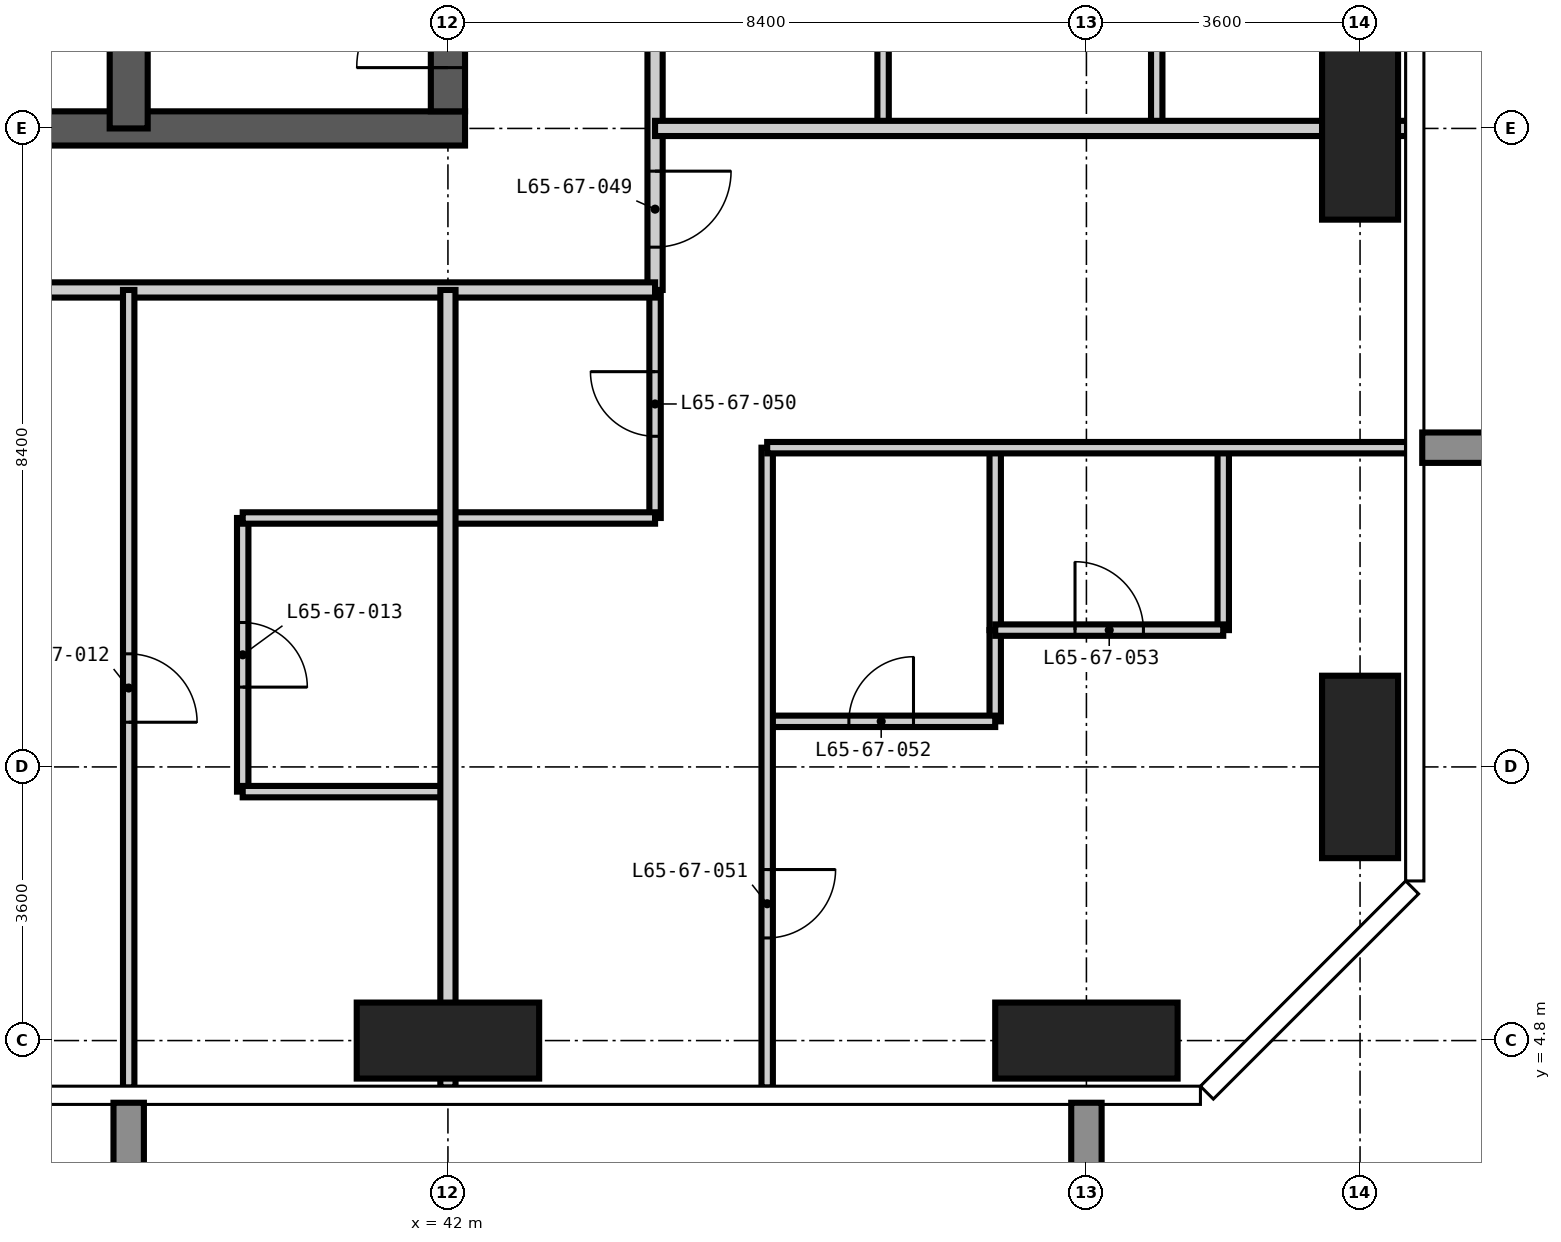
"""IFC4 building model, lengths in metres.
Left out: names, types, materials, properties, quantities, classifications, styles, units other than length and angle.
Written with IfcOpenShell. Run it as: python <this file> out.ifc"""

import sys

from ifc_helpers import new_model, si_unit, direction, frame, frame_2d, origin, origin_2d, place, context, subcontext, project, spatial, rectangle, extrude, element, fill, save


model = new_model("IFC4")
c1 = context("Model", 3, precision=1e-05, world=origin(), true_north=direction((0.0, 1.0)))
c2 = subcontext(c1, "Body", "Model", "MODEL_VIEW")
j1 = project(units=[si_unit("LENGTHUNIT", "METRE"), si_unit("PLANEANGLEUNIT", "RADIAN")], contexts=[c1])
p1 = place(None, origin())
s1 = spatial("IfcSite", under=j1, at=p1, CompositionType="ELEMENT")
p2 = place(p1, origin())
s2 = spatial("IfcBuilding", under=s1, at=p2, CompositionType="ELEMENT")
p3 = place(p2, frame((0.0, 0.0, 252.9)))
s3 = spatial("IfcBuildingStorey", under=s2, at=p3, CompositionType="ELEMENT", Elevation=252.9)
for number, where, z_axis, x_axis in (
    (1, (42.0, 4.8, -0.35), (0.0, 0.0, 1.0), (1.0, 0.0, 0.0)),
    (2, (50.4, 4.8, -0.35), (0.0, 0.0, 1.0), (1.0, 0.0, 0.0)),
):
    element("IfcColumn", number, at=place(p3, frame(where, z_axis=z_axis, x_axis=x_axis)), inside=s3, PredefinedType="COLUMN", context=c2, shape_type="SweptSolid", body=[
        extrude(rectangle(XDim=2.4, YDim=1.0, at=origin_2d()), origin(), (0.0, 0.0, 1.0), 3.9),
    ])
for number, where, z_axis, x_axis in (
    (3, (54.0, 8.4, -0.35), (0.0, 0.0, 1.0), (1.0, 0.0, 0.0)),
    (4, (54.0, 16.8, -0.35), (0.0, 0.0, 1.0), (1.0, 0.0, 0.0)),
):
    element("IfcColumn", number, at=place(p3, frame(where, z_axis=z_axis, x_axis=x_axis)), inside=s3, PredefinedType="COLUMN", context=c2, shape_type="SweptSolid", body=[
        extrude(rectangle(XDim=1.0, YDim=2.4, at=origin_2d()), origin(), (0.0, 0.0, 1.0), 3.9),
    ])
p4 = place(p3, frame((24.975, 16.8, -0.35), z_axis=(0.0, 0.0, 1.0), x_axis=(1.0, 0.0, 0.0)))
e5 = element("IfcWall", 5, at=p4, inside=s3, PredefinedType="SHEAR", context=c2, shape_type="SweptSolid", body=[
    extrude(rectangle(XDim=17.25, YDim=0.45, at=frame_2d((8.625, 0.0))), origin(), (0.0, 0.0, 1.0), 3.9),
])
p5 = place(p4, frame((3.925, 0.0, 0.35)))
e6 = element("IfcOpeningElement", 6, at=p5, cuts=e5, PredefinedType="OPENING", context=c2, shape_type="SweptSolid", body=[
    extrude(rectangle(XDim=1.0, YDim=2.1, at=frame_2d((0.5, 1.05))), frame((0.0, 0.235, 0.0), z_axis=(0.0, -1.0, 0.0), x_axis=(1.0, 0.0, 0.0)), (0.0, 0.0, 1.0), 0.47),
])
p6 = place(p4, frame((10.225, 0.0, 0.35)))
e7 = element("IfcOpeningElement", 7, at=p6, cuts=e5, PredefinedType="OPENING", context=c2, shape_type="SweptSolid", body=[
    extrude(rectangle(XDim=1.0, YDim=2.1, at=frame_2d((0.5, 1.05))), frame((0.0, 0.235, 0.0), z_axis=(0.0, -1.0, 0.0), x_axis=(1.0, 0.0, 0.0)), (0.0, 0.0, 1.0), 0.47),
])
p7 = place(p3, frame((42.0, 17.025, -0.35), z_axis=(0.0, 0.0, 1.0), x_axis=(0.0, 1.0, 0.0)))
e8 = element("IfcWall", 8, at=p7, inside=s3, PredefinedType="SHEAR", context=c2, shape_type="SweptSolid", body=[
    extrude(rectangle(XDim=24.75, YDim=0.45, at=frame_2d((12.375, 0.0))), origin(), (0.0, 0.0, 1.0), 3.9),
])
p8 = place(p7, frame((0.575, 0.0, 0.35)))
e9 = element("IfcOpeningElement", 9, at=p8, cuts=e8, PredefinedType="OPENING", context=c2, shape_type="SweptSolid", body=[
    extrude(rectangle(XDim=1.2, YDim=2.2, at=frame_2d((0.6, 1.1))), frame((0.0, 0.235, 0.0), z_axis=(0.0, -1.0, 0.0), x_axis=(1.0, 0.0, 0.0)), (0.0, 0.0, 1.0), 0.47),
])
p9 = place(p7, frame((11.475, 0.0, 0.35)))
e10 = element("IfcOpeningElement", 10, at=p9, cuts=e8, PredefinedType="OPENING", context=c2, shape_type="SweptSolid", body=[
    extrude(rectangle(XDim=1.8, YDim=2.2, at=frame_2d((0.9, 1.1))), frame((0.0, 0.235, 0.0), z_axis=(0.0, -1.0, 0.0), x_axis=(1.0, 0.0, 0.0)), (0.0, 0.0, 1.0), 0.47),
])
p10 = place(p7, frame((20.275, 0.0, 0.35)))
e11 = element("IfcOpeningElement", 11, at=p10, cuts=e8, PredefinedType="OPENING", context=c2, shape_type="SweptSolid", body=[
    extrude(rectangle(XDim=1.0, YDim=2.1, at=frame_2d((0.5, 1.05))), frame((0.0, 0.235, 0.0), z_axis=(0.0, -1.0, 0.0), x_axis=(1.0, 0.0, 0.0)), (0.0, 0.0, 1.0), 0.47),
])
p11 = place(p3, frame((37.8, 16.8, -0.35), z_axis=(0.0, 0.0, 1.0), x_axis=(0.0, 1.0, 0.0)))
e12 = element("IfcWall", 12, at=p11, inside=s3, PredefinedType="SHEAR", context=c2, shape_type="SweptSolid", body=[
    extrude(rectangle(XDim=11.2, YDim=0.5, at=frame_2d((5.6, 0.0))), origin(), (0.0, 0.0, 1.0), 3.9),
])
p12 = place(p3, frame((39.3, 8.075, 0.0), z_axis=(0.0, 0.0, 1.0), x_axis=(0.0, 1.0, 0.0)))
e13 = element("IfcWall", 13, at=p12, inside=s3, PredefinedType="PARTITIONING", context=c2, shape_type="SweptSolid", body=[
    extrude(rectangle(XDim=3.6, YDim=0.15, at=frame_2d((1.8, 0.0))), origin(), (0.0, 0.0, 1.0), 3.55),
])
p13 = place(p12, frame((1.375, 0.0, 0.0)))
e14 = element("IfcOpeningElement", 14, at=p13, cuts=e13, PredefinedType="OPENING", context=c2, shape_type="SweptSolid", body=[
    extrude(rectangle(XDim=0.85, YDim=2.1, at=frame_2d((0.425, 1.05))), frame((0.0, 0.085, 0.0), z_axis=(0.0, -1.0, 0.0), x_axis=(1.0, 0.0, 0.0)), (0.0, 0.0, 1.0), 0.17),
])
p14 = place(p3, frame((44.725, 11.675, 0.0), z_axis=(0.0, 0.0, 1.0), x_axis=(0.0, 1.0, 0.0)))
e15 = element("IfcWall", 15, at=p14, inside=s3, PredefinedType="PARTITIONING", context=c2, shape_type="SweptSolid", body=[
    extrude(rectangle(XDim=3.0, YDim=0.15, at=frame_2d((1.5, 0.0))), origin(), (0.0, 0.0, 1.0), 3.55),
])
p15 = place(p14, frame((1.075, 0.0, 0.0)))
e16 = element("IfcOpeningElement", 16, at=p15, cuts=e15, PredefinedType="OPENING", context=c2, shape_type="SweptSolid", body=[
    extrude(rectangle(XDim=0.85, YDim=2.1, at=frame_2d((0.425, 1.05))), frame((0.0, 0.085, 0.0), z_axis=(0.0, -1.0, 0.0), x_axis=(1.0, 0.0, 0.0)), (0.0, 0.0, 1.0), 0.17),
])
p16 = place(p3, frame((47.725, 16.8, 0.0), z_axis=(0.0, 0.0, 1.0), x_axis=(0.0, 1.0, 0.0)))
e17 = element("IfcWall", 17, at=p16, inside=s3, PredefinedType="PARTITIONING", context=c2, shape_type="SweptSolid", body=[
    extrude(rectangle(XDim=2.7, YDim=0.15, at=frame_2d((1.35, 0.0))), origin(), (0.0, 0.0, 1.0), 3.55),
])
p17 = place(p3, frame((49.2, 9.0, 0.0), z_axis=(0.0, 0.0, 1.0), x_axis=(0.0, 1.0, 0.0)))
e18 = element("IfcWall", 18, at=p17, inside=s3, PredefinedType="PARTITIONING", context=c2, shape_type="SweptSolid", body=[
    extrude(rectangle(XDim=1.2, YDim=0.15, at=frame_2d((0.6, 0.0))), origin(), (0.0, 0.0, 1.0), 3.55),
])
for number, where, z_axis, x_axis in (
    (19, (51.325, 16.8, 0.0), (0.0, 0.0, 1.0), (0.0, 1.0, 0.0)),
    (20, (39.3, 8.075, 0.0), (0.0, 0.0, 1.0), (1.0, 0.0, 0.0)),
):
    element("IfcWall", number, at=place(p3, frame(where, z_axis=z_axis, x_axis=x_axis)), inside=s3, PredefinedType="PARTITIONING", context=c2, shape_type="SweptSolid", body=[
        extrude(rectangle(XDim=2.7, YDim=0.15, at=frame_2d((1.35, 0.0))), origin(), (0.0, 0.0, 1.0), 3.55),
    ])
p18 = place(p3, frame((46.2, 9.0, 0.0), z_axis=(0.0, 0.0, 1.0), x_axis=(1.0, 0.0, 0.0)))
e21 = element("IfcWall", 21, at=p18, inside=s3, PredefinedType="PARTITIONING", context=c2, shape_type="SweptSolid", body=[
    extrude(rectangle(XDim=3.0, YDim=0.15, at=frame_2d((1.5, 0.0))), origin(), (0.0, 0.0, 1.0), 3.55),
])
p19 = place(p18, frame((1.075, 0.0, 0.0)))
e22 = element("IfcOpeningElement", 22, at=p19, cuts=e21, PredefinedType="OPENING", context=c2, shape_type="SweptSolid", body=[
    extrude(rectangle(XDim=0.85, YDim=2.1, at=frame_2d((0.425, 1.05))), frame((0.0, 0.085, 0.0), z_axis=(0.0, -1.0, 0.0), x_axis=(1.0, 0.0, 0.0)), (0.0, 0.0, 1.0), 0.17),
])
p20 = place(p3, frame((39.3, 11.675, 0.0), z_axis=(0.0, 0.0, 1.0), x_axis=(1.0, 0.0, 0.0)))
e23 = element("IfcWall", 23, at=p20, inside=s3, PredefinedType="PARTITIONING", context=c2, shape_type="SweptSolid", body=[
    extrude(rectangle(XDim=5.425, YDim=0.15, at=frame_2d((2.712, 0.0))), origin(), (0.0, 0.0, 1.0), 3.55),
])
p21 = place(p3, frame((44.725, 29.4, 0.0), z_axis=(0.0, 0.0, 1.0), x_axis=(0.0, -1.0, 0.0)))
e24 = element("IfcWall", 24, at=p21, inside=s3, PredefinedType="PARTITIONING", context=c2, shape_type="SweptSolid", body=[
    extrude(rectangle(XDim=14.725, YDim=0.2, at=frame_2d((7.362, 0.0))), origin(), (0.0, 0.0, 1.0), 3.55),
])
p22 = place(p21, frame((5.8, 0.0, 0.0)))
e25 = element("IfcOpeningElement", 25, at=p22, cuts=e24, PredefinedType="OPENING", context=c2, shape_type="SweptSolid", body=[
    extrude(rectangle(XDim=1.0, YDim=2.2, at=frame_2d((0.5, 1.1))), frame((0.0, 0.11, 0.0), z_axis=(0.0, -1.0, 0.0), x_axis=(1.0, 0.0, 0.0)), (0.0, 0.0, 1.0), 0.22),
])
p23 = place(p21, frame((13.162, 0.0, 0.0)))
e26 = element("IfcOpeningElement", 26, at=p23, cuts=e24, PredefinedType="OPENING", context=c2, shape_type="SweptSolid", body=[
    extrude(rectangle(XDim=1.0, YDim=2.2, at=frame_2d((0.5, 1.1))), frame((0.0, 0.11, 0.0), z_axis=(0.0, -1.0, 0.0), x_axis=(1.0, 0.0, 0.0)), (0.0, 0.0, 1.0), 0.22),
])
p24 = place(p3, frame((44.725, 14.675, 0.0), z_axis=(0.0, 0.0, 1.0), x_axis=(-1.0, 0.0, 0.0)))
e27 = element("IfcWall", 27, at=p24, inside=s3, PredefinedType="PARTITIONING", context=c2, shape_type="SweptSolid", body=[
    extrude(rectangle(XDim=21.65, YDim=0.2, at=frame_2d((10.825, 0.0))), origin(), (0.0, 0.0, 1.0), 3.55),
])
p25 = place(p24, frame((11.825, 0.0, 0.0)))
e28 = element("IfcOpeningElement", 28, at=p25, cuts=e27, PredefinedType="OPENING", context=c2, shape_type="SweptSolid", body=[
    extrude(rectangle(XDim=1.0, YDim=2.2, at=frame_2d((0.5, 1.1))), frame((0.0, 0.11, 0.0), z_axis=(0.0, -1.0, 0.0), x_axis=(1.0, 0.0, 0.0)), (0.0, 0.0, 1.0), 0.22),
])
p26 = place(p3, frame((42.0, 4.182, 0.0), z_axis=(0.0, 0.0, 1.0), x_axis=(0.0, 1.0, 0.0)))
e29 = element("IfcWall", 29, at=p26, inside=s3, PredefinedType="PARTITIONING", context=c2, shape_type="SweptSolid", body=[
    extrude(rectangle(XDim=10.493, YDim=0.2, at=frame_2d((5.247, 0.0))), origin(), (0.0, 0.0, 1.0), 3.55),
])
p27 = place(p3, frame((44.725, 16.8, 0.0), z_axis=(0.0, 0.0, 1.0), x_axis=(1.0, 0.0, 0.0)))
e30 = element("IfcWall", 30, at=p27, inside=s3, PredefinedType="PARTITIONING", context=c2, shape_type="SweptSolid", body=[
    extrude(rectangle(XDim=9.893, YDim=0.2, at=frame_2d((4.946, 0.0))), origin(), (0.0, 0.0, 1.0), 3.55),
])
p28 = place(p3, frame((37.8, 4.182, 0.0), z_axis=(0.0, 0.0, 1.0), x_axis=(0.0, 1.0, 0.0)))
e31 = element("IfcWall", 31, at=p28, inside=s3, PredefinedType="PARTITIONING", context=c2, shape_type="SweptSolid", body=[
    extrude(rectangle(XDim=10.493, YDim=0.15, at=frame_2d((5.247, 0.0))), origin(), (0.0, 0.0, 1.0), 3.55),
])
p29 = place(p28, frame((4.806, 0.0, 0.0)))
e32 = element("IfcOpeningElement", 32, at=p29, cuts=e31, PredefinedType="OPENING", context=c2, shape_type="SweptSolid", body=[
    extrude(rectangle(XDim=0.9, YDim=2.1, at=frame_2d((0.45, 1.05))), frame((0.0, 0.085, 0.0), z_axis=(0.0, -1.0, 0.0), x_axis=(1.0, 0.0, 0.0)), (0.0, 0.0, 1.0), 0.17),
])
p30 = place(p3, frame((46.2, 4.182, 0.0), z_axis=(0.0, 0.0, 1.0), x_axis=(0.0, 1.0, 0.0)))
e33 = element("IfcWall", 33, at=p30, inside=s3, PredefinedType="PARTITIONING", context=c2, shape_type="SweptSolid", body=[
    extrude(rectangle(XDim=8.418, YDim=0.15, at=frame_2d((4.209, 0.0))), origin(), (0.0, 0.0, 1.0), 3.55),
])
p31 = place(p30, frame((1.968, 0.0, 0.0)))
e34 = element("IfcOpeningElement", 34, at=p31, cuts=e33, PredefinedType="OPENING", context=c2, shape_type="SweptSolid", body=[
    extrude(rectangle(XDim=0.9, YDim=2.1, at=frame_2d((0.45, 1.05))), frame((0.0, 0.085, 0.0), z_axis=(0.0, -1.0, 0.0), x_axis=(1.0, 0.0, 0.0)), (0.0, 0.0, 1.0), 0.17),
])
for number, where, z_axis, x_axis in (
    (35, (49.2, 10.2, 0.0), (0.0, 0.0, 1.0), (0.0, 1.0, 0.0)),
    (36, (52.2, 10.2, 0.0), (0.0, 0.0, 1.0), (0.0, 1.0, 0.0)),
):
    element("IfcWall", number, at=place(p3, frame(where, z_axis=z_axis, x_axis=x_axis)), inside=s3, PredefinedType="PARTITIONING", context=c2, shape_type="SweptSolid", body=[
        extrude(rectangle(XDim=2.4, YDim=0.15, at=frame_2d((1.2, 0.0))), origin(), (0.0, 0.0, 1.0), 3.55),
    ])
p32 = place(p3, frame((49.2, 10.2, 0.0), z_axis=(0.0, 0.0, 1.0), x_axis=(1.0, 0.0, 0.0)))
e37 = element("IfcWall", 37, at=p32, inside=s3, PredefinedType="PARTITIONING", context=c2, shape_type="SweptSolid", body=[
    extrude(rectangle(XDim=3.0, YDim=0.15, at=frame_2d((1.5, 0.0))), origin(), (0.0, 0.0, 1.0), 3.55),
])
p33 = place(p32, frame((1.05, 0.0, 0.0)))
e38 = element("IfcOpeningElement", 38, at=p33, cuts=e37, PredefinedType="OPENING", context=c2, shape_type="SweptSolid", body=[
    extrude(rectangle(XDim=0.9, YDim=2.1, at=frame_2d((0.45, 1.05))), frame((0.0, 0.085, 0.0), z_axis=(0.0, -1.0, 0.0), x_axis=(1.0, 0.0, 0.0)), (0.0, 0.0, 1.0), 0.17),
])
p34 = place(p3, frame((46.2, 12.6, 0.0), z_axis=(0.0, 0.0, 1.0), x_axis=(1.0, 0.0, 0.0)))
e39 = element("IfcWall", 39, at=p34, inside=s3, PredefinedType="PARTITIONING", context=c2, shape_type="SweptSolid", body=[
    extrude(rectangle(XDim=8.418, YDim=0.15, at=frame_2d((4.209, 0.0))), origin(), (0.0, 0.0, 1.0), 3.55),
])
p35 = place(p8, origin())
e40 = element("IfcDoor", 40, at=p35, inside=s3, OperationType="SINGLE_SWING_LEFT", PredefinedType="DOOR", context=c2, shape_type="SweptSolid", body=[
    extrude(rectangle(XDim=1.2, YDim=2.2, at=frame_2d((0.6, 1.1))), frame((0.0, 0.025, 0.0), z_axis=(0.0, -1.0, 0.0), x_axis=(1.0, 0.0, 0.0)), (0.0, 0.0, 1.0), 0.05),
])
fill(e9, e40)
p36 = place(p29, frame((0.9, 0.0, 0.0), z_axis=(0.0, 0.0, 1.0), x_axis=(-1.0, 0.0, 0.0)))
e41 = element("IfcDoor", 41, at=p36, inside=s3, OperationType="SINGLE_SWING_RIGHT", PredefinedType="DOOR", context=c2, shape_type="SweptSolid", body=[
    extrude(rectangle(XDim=0.9, YDim=2.1, at=frame_2d((0.45, 1.05))), frame((0.0, 0.025, 0.0), z_axis=(0.0, -1.0, 0.0), x_axis=(1.0, 0.0, 0.0)), (0.0, 0.0, 1.0), 0.05),
])
fill(e32, e41)
p37 = place(p13, frame((0.85, 0.0, 0.0), z_axis=(0.0, 0.0, 1.0), x_axis=(-1.0, 0.0, 0.0)))
e42 = element("IfcDoor", 42, at=p37, inside=s3, OperationType="SINGLE_SWING_RIGHT", PredefinedType="DOOR", context=c2, shape_type="SweptSolid", body=[
    extrude(rectangle(XDim=0.85, YDim=2.1, at=frame_2d((0.425, 1.05))), frame((0.0, 0.025, 0.0), z_axis=(0.0, -1.0, 0.0), x_axis=(1.0, 0.0, 0.0)), (0.0, 0.0, 1.0), 0.05),
])
fill(e14, e42)
p38 = place(p23, origin())
e43 = element("IfcDoor", 43, at=p38, inside=s3, OperationType="SINGLE_SWING_LEFT", PredefinedType="DOOR", context=c2, shape_type="SweptSolid", body=[
    extrude(rectangle(XDim=1.0, YDim=2.2, at=frame_2d((0.5, 1.1))), frame((0.0, 0.025, 0.0), z_axis=(0.0, -1.0, 0.0), x_axis=(1.0, 0.0, 0.0)), (0.0, 0.0, 1.0), 0.05),
])
fill(e26, e43)
p39 = place(p15, origin())
e44 = element("IfcDoor", 44, at=p39, inside=s3, OperationType="SINGLE_SWING_RIGHT", PredefinedType="DOOR", context=c2, shape_type="SweptSolid", body=[
    extrude(rectangle(XDim=0.85, YDim=2.1, at=frame_2d((0.425, 1.05))), frame((0.0, 0.025, 0.0), z_axis=(0.0, -1.0, 0.0), x_axis=(1.0, 0.0, 0.0)), (0.0, 0.0, 1.0), 0.05),
])
fill(e16, e44)
p40 = place(p31, frame((0.9, 0.0, 0.0), z_axis=(0.0, 0.0, 1.0), x_axis=(-1.0, 0.0, 0.0)))
e45 = element("IfcDoor", 45, at=p40, inside=s3, OperationType="SINGLE_SWING_LEFT", PredefinedType="DOOR", context=c2, shape_type="SweptSolid", body=[
    extrude(rectangle(XDim=0.9, YDim=2.1, at=frame_2d((0.45, 1.05))), frame((0.0, 0.025, 0.0), z_axis=(0.0, -1.0, 0.0), x_axis=(1.0, 0.0, 0.0)), (0.0, 0.0, 1.0), 0.05),
])
fill(e34, e45)
p41 = place(p19, origin())
e46 = element("IfcDoor", 46, at=p41, inside=s3, OperationType="SINGLE_SWING_RIGHT", PredefinedType="DOOR", context=c2, shape_type="SweptSolid", body=[
    extrude(rectangle(XDim=0.85, YDim=2.1, at=frame_2d((0.425, 1.05))), frame((0.0, 0.025, 0.0), z_axis=(0.0, -1.0, 0.0), x_axis=(1.0, 0.0, 0.0)), (0.0, 0.0, 1.0), 0.05),
])
fill(e22, e46)
p42 = place(p33, origin())
e47 = element("IfcDoor", 47, at=p42, inside=s3, OperationType="SINGLE_SWING_LEFT", PredefinedType="DOOR", context=c2, shape_type="SweptSolid", body=[
    extrude(rectangle(XDim=0.9, YDim=2.1, at=frame_2d((0.45, 1.05))), frame((0.0, 0.025, 0.0), z_axis=(0.0, -1.0, 0.0), x_axis=(1.0, 0.0, 0.0)), (0.0, 0.0, 1.0), 0.05),
])
fill(e38, e47)
save(model, sys.argv[1])
